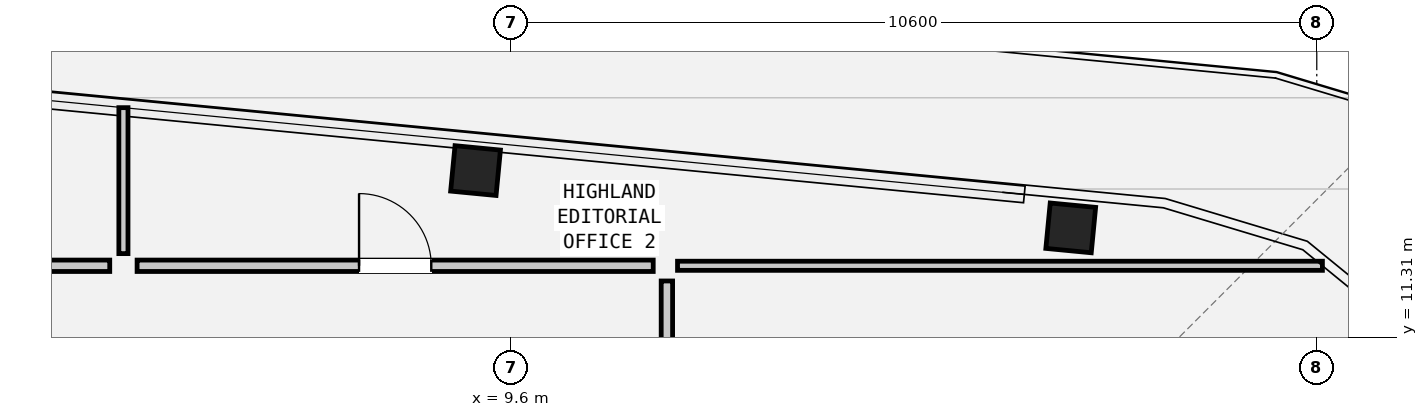
"""IFC4 building model, lengths in metres.
Left out: names, types, materials, properties, quantities, classifications, styles, units other than length and angle.
Written with IfcOpenShell. Run it as: python <this file> out.ifc"""

import sys

from ifc_helpers import new_model, si_unit, direction, frame, frame_2d, origin, origin_2d, place, context, subcontext, project, spatial, rectangle, hollow_rectangle, extrude, element, fill, save


model = new_model("IFC4")
c1 = context("Model", 3, precision=1e-05, world=origin(), true_north=direction((0.0, 1.0)))
c2 = subcontext(c1, "Body", "Model", "MODEL_VIEW")
j1 = project(units=[si_unit("LENGTHUNIT", "METRE"), si_unit("PLANEANGLEUNIT", "RADIAN")], contexts=[c1])
p1 = place(None, origin())
s1 = spatial("IfcSite", under=j1, at=p1, CompositionType="ELEMENT")
p2 = place(p1, origin())
s2 = spatial("IfcBuilding", under=s1, at=p2, CompositionType="ELEMENT")
p3 = place(p2, frame((0.0, 0.0, 273.35)))
s3 = spatial("IfcBuildingStorey", under=s2, at=p3, CompositionType="ELEMENT", Elevation=273.35)
for number, where, z_axis, x_axis in (
    (1, (16.963, 12.749, 0.0), (0.0, 0.0, 1.0), (0.995, -0.096, 0.0)),
    (2, (9.133, 13.502, 0.0), (0.0, 0.0, 1.0), (0.995, -0.096, 0.0)),
):
    element("IfcColumn", number, at=place(p3, frame(where, z_axis=z_axis, x_axis=x_axis)), inside=s3, PredefinedType="COLUMN", context=c2, shape_type="SweptSolid", body=[
        extrude(hollow_rectangle(XDim=0.6, YDim=0.6, WallThickness=0.04, at=origin_2d()), origin(), (0.0, 0.0, 1.0), 3.6),
    ])
p4 = place(p3, frame((11.79, 12.25, 0.0), z_axis=(0.0, 0.0, 1.0), x_axis=(1.0, 0.0, 0.0)))
e3 = element("IfcWall", 3, at=p4, inside=s3, PredefinedType="PARTITIONING", context=c2, shape_type="SweptSolid", body=[
    extrude(rectangle(XDim=8.484, YDim=0.12, at=frame_2d((4.242, 0.0))), origin(), (0.0, 0.0, 1.0), 3.41),
])
p5 = place(p3, frame((4.5, 12.41, 0.0), z_axis=(0.0, 0.0, 1.0), x_axis=(0.0, 1.0, 0.0)))
e4 = element("IfcWall", 4, at=p5, inside=s3, PredefinedType="PARTITIONING", context=c2, shape_type="SweptSolid", body=[
    extrude(rectangle(XDim=1.92, YDim=0.12, at=frame_2d((0.96, 0.0))), origin(), (0.0, 0.0, 1.0), 3.41),
])
p6 = place(p3, frame((-4.32, 12.25, 0.0), z_axis=(0.0, 0.0, 1.0), x_axis=(1.0, 0.0, 0.0)))
e5 = element("IfcWall", 5, at=p6, inside=s3, PredefinedType="PARTITIONING", context=c2, shape_type="SweptSolid", body=[
    extrude(rectangle(XDim=8.64, YDim=0.15, at=frame_2d((4.32, 0.0))), origin(), (0.0, 0.0, 1.0), 3.41),
])
p7 = place(p6, frame((3.845, 0.0, 0.0)))
e6 = element("IfcOpeningElement", 6, at=p7, cuts=e5, PredefinedType="OPENING", context=c2, shape_type="SweptSolid", body=[
    extrude(rectangle(XDim=0.95, YDim=2.1, at=frame_2d((0.475, 1.05))), frame((0.0, 0.087, 0.0), z_axis=(0.0, -1.0, 0.0), x_axis=(1.0, 0.0, 0.0)), (0.0, 0.0, 1.0), 0.174),
])
p8 = place(p3, frame((4.68, 12.25, 0.0), z_axis=(0.0, 0.0, 1.0), x_axis=(1.0, 0.0, 0.0)))
e7 = element("IfcWall", 7, at=p8, inside=s3, PredefinedType="PARTITIONING", context=c2, shape_type="SweptSolid", body=[
    extrude(rectangle(XDim=6.79, YDim=0.15, at=frame_2d((3.395, 0.0))), origin(), (0.0, 0.0, 1.0), 3.41),
])
p9 = place(p8, frame((2.92, 0.0, 0.0)))
e8 = element("IfcOpeningElement", 8, at=p9, cuts=e7, PredefinedType="OPENING", context=c2, shape_type="SweptSolid", body=[
    extrude(rectangle(XDim=0.95, YDim=2.1, at=frame_2d((0.475, 1.05))), frame((0.0, 0.087, 0.0), z_axis=(0.0, -1.0, 0.0), x_axis=(1.0, 0.0, 0.0)), (0.0, 0.0, 1.0), 0.174),
])
p10 = place(p3, frame((11.65, 3.8, 0.0), z_axis=(0.0, 0.0, 1.0), x_axis=(0.0, 1.0, 0.0)))
e9 = element("IfcWall", 9, at=p10, inside=s3, PredefinedType="PARTITIONING", context=c2, shape_type="SweptSolid", body=[
    extrude(rectangle(XDim=8.25, YDim=0.15, at=frame_2d((4.125, 0.0))), origin(), (0.0, 0.0, 1.0), 3.41),
])
p11 = place(p10, frame((3.65, 0.0, 0.0)))
e10 = element("IfcOpeningElement", 10, at=p11, cuts=e9, PredefinedType="OPENING", context=c2, shape_type="SweptSolid", body=[
    extrude(rectangle(XDim=0.95, YDim=2.1, at=frame_2d((0.475, 1.05))), frame((0.0, 0.087, 0.0), z_axis=(0.0, -1.0, 0.0), x_axis=(1.0, 0.0, 0.0)), (0.0, 0.0, 1.0), 0.174),
])
p12 = place(p9, origin())
e11 = element("IfcDoor", 11, at=p12, inside=s3, OperationType="SINGLE_SWING_LEFT", PredefinedType="DOOR", context=c2, shape_type="SweptSolid", body=[
    extrude(rectangle(XDim=0.95, YDim=2.1, at=frame_2d((0.475, 1.05))), frame((0.0, 0.025, 0.0), z_axis=(0.0, -1.0, 0.0), x_axis=(1.0, 0.0, 0.0)), (0.0, 0.0, 1.0), 0.05),
])
fill(e8, e11)
save(model, sys.argv[1])
